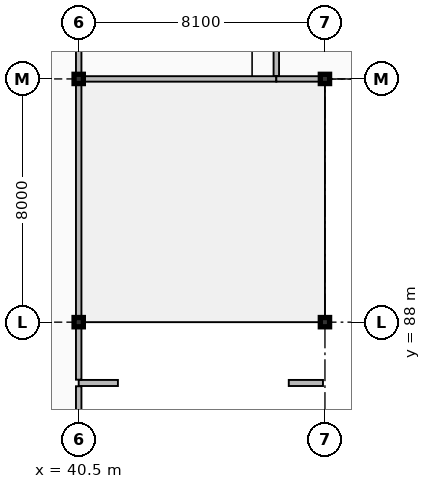
"""IFC4 building model, lengths in metres.
Left out: names, types, materials, properties, quantities, classifications, styles, units other than length and angle.
Written with IfcOpenShell. Run it as: python <this file> out.ifc"""

import sys

from ifc_helpers import new_model, si_unit, direction, frame, frame_2d, origin, origin_2d, place, context, subcontext, project, spatial, rectangle, hollow_rectangle, extrude, element, fill, save


model = new_model("IFC4")
c1 = context("Model", 3, precision=1e-05, world=origin(), true_north=direction((0.0, 1.0)))
c2 = subcontext(c1, "Body", "Model", "MODEL_VIEW")
j1 = project(units=[si_unit("LENGTHUNIT", "METRE"), si_unit("PLANEANGLEUNIT", "RADIAN")], contexts=[c1])
p1 = place(None, origin())
s1 = spatial("IfcSite", under=j1, at=p1, CompositionType="ELEMENT")
p2 = place(p1, origin())
s2 = spatial("IfcBuilding", under=s1, at=p2, CompositionType="ELEMENT")
p3 = place(p2, frame((0.0, 0.0, 14.7)))
s3 = spatial("IfcBuildingStorey", under=s2, at=p3, CompositionType="ELEMENT", Elevation=14.7)
for number, where, z_axis, x_axis in (
    (1, (40.5, 88.0, 0.0), (0.0, 0.0, 1.0), (1.0, 0.0, 0.0)),
    (2, (40.5, 96.0, 0.0), (0.0, 0.0, 1.0), (1.0, 0.0, 0.0)),
):
    element("IfcColumn", number, at=place(p3, frame(where, z_axis=z_axis, x_axis=x_axis)), inside=s3, PredefinedType="COLUMN", context=c2, shape_type="SweptSolid", body=[
        extrude(hollow_rectangle(XDim=0.305, YDim=0.305, WallThickness=0.016, InnerFilletRadius=0.016, OuterFilletRadius=0.032, at=origin_2d()), origin(), (0.0, 0.0, 1.0), 5.1),
    ])
p4 = place(p3, frame((48.6, 88.0, 0.0), z_axis=(0.0, 0.0, 1.0), x_axis=(1.0, 0.0, 0.0)))
e3 = element("IfcColumn", 3, at=p4, inside=s3, PredefinedType="COLUMN", context=c2, shape_type="SweptSolid", body=[
    extrude(hollow_rectangle(XDim=0.305, YDim=0.305, WallThickness=0.016, InnerFilletRadius=0.016, OuterFilletRadius=0.032, at=origin_2d()), origin(), (0.0, 0.0, 1.0), 4.84),
])
p5 = place(p3, frame((48.6, 96.0, 0.0), z_axis=(0.0, 0.0, 1.0), x_axis=(1.0, 0.0, 0.0)))
e4 = element("IfcColumn", 4, at=p5, inside=s3, PredefinedType="COLUMN", context=c2, shape_type="SweptSolid", body=[
    extrude(hollow_rectangle(XDim=0.305, YDim=0.305, WallThickness=0.016, InnerFilletRadius=0.016, OuterFilletRadius=0.032, at=origin_2d()), origin(), (0.0, 0.0, 1.0), 5.1),
])
p6 = place(p3, frame((40.5, 86.0, 0.0), z_axis=(0.0, 0.0, 1.0), x_axis=(1.0, 0.0, 0.0)))
e5 = element("IfcWall", 5, at=p6, inside=s3, PredefinedType="PARTITIONING", context=c2, shape_type="SweptSolid", body=[
    extrude(rectangle(XDim=1.29, YDim=0.2, at=frame_2d((0.645, 0.0))), origin(), (0.0, 0.0, 1.0), 4.84),
])
p7 = place(p3, frame((47.41, 86.0, 0.0), z_axis=(0.0, 0.0, 1.0), x_axis=(1.0, 0.0, 0.0)))
e6 = element("IfcWall", 6, at=p7, inside=s3, PredefinedType="PARTITIONING", context=c2, shape_type="SweptSolid", body=[
    extrude(rectangle(XDim=1.125, YDim=0.2, at=frame_2d((0.562, 0.0))), origin(), (0.0, 0.0, 1.0), 4.84),
])
p8 = place(p3, frame((40.66, 96.0, 0.0), z_axis=(0.0, 0.0, 1.0), x_axis=(1.0, 0.0, 0.0)))
e7 = element("IfcWall", 7, at=p8, inside=s3, PredefinedType="PARTITIONING", context=c2, shape_type="SweptSolid", body=[
    extrude(rectangle(XDim=6.34, YDim=0.18, at=frame_2d((3.17, 0.0))), origin(), (0.0, 0.0, 1.0), 4.299),
])
p9 = place(p3, frame((47.0, 96.0, 0.0), z_axis=(0.0, 0.0, 1.0), x_axis=(1.0, 0.0, 0.0)))
e8 = element("IfcWall", 8, at=p9, inside=s3, PredefinedType="PARTITIONING", context=c2, shape_type="SweptSolid", body=[
    extrude(rectangle(XDim=1.44, YDim=0.18, at=frame_2d((0.72, 0.0))), origin(), (0.0, 0.0, 1.0), 4.299),
])
p10 = place(p3, frame((40.5, 80.16, 0.0), z_axis=(0.0, 0.0, 1.0), x_axis=(0.0, 1.0, 0.0)))
e9 = element("IfcWall", 9, at=p10, inside=s3, PredefinedType="PARTITIONING", context=c2, shape_type="SweptSolid", body=[
    extrude(rectangle(XDim=5.732, YDim=0.18, at=frame_2d((2.866, 0.0))), origin(), (0.0, 0.0, 1.0), 4.369),
])
p11 = place(p3, frame((40.5, 86.108, 0.0), z_axis=(0.0, 0.0, 1.0), x_axis=(0.0, 1.0, 0.0)))
e10 = element("IfcWall", 10, at=p11, inside=s3, PredefinedType="PARTITIONING", context=c2, shape_type="SweptSolid", body=[
    extrude(rectangle(XDim=1.732, YDim=0.18, at=frame_2d((0.866, 0.0))), origin(), (0.0, 0.0, 1.0), 4.369),
])
p12 = place(p3, frame((40.5, 88.16, 0.0), z_axis=(0.0, 0.0, 1.0), x_axis=(0.0, 1.0, 0.0)))
e11 = element("IfcWall", 11, at=p12, inside=s3, PredefinedType="PARTITIONING", context=c2, shape_type="SweptSolid", body=[
    extrude(rectangle(XDim=7.679, YDim=0.18, at=frame_2d((3.84, 0.0))), origin(), (0.0, 0.0, 1.0), 4.369),
])
p13 = place(p12, frame((3.29, 0.0, 0.0)))
e12 = element("IfcOpeningElement", 12, at=p13, cuts=e11, PredefinedType="OPENING", context=c2, shape_type="SweptSolid", body=[
    extrude(rectangle(XDim=1.1, YDim=2.2, at=frame_2d((0.55, 1.1))), frame((0.0, 0.1, 0.0), z_axis=(0.0, -1.0, 0.0), x_axis=(1.0, 0.0, 0.0)), (0.0, 0.0, 1.0), 0.2),
])
p14 = place(p3, frame((40.5, 96.16, 0.0), z_axis=(0.0, 0.0, 1.0), x_axis=(0.0, 1.0, 0.0)))
e13 = element("IfcWall", 13, at=p14, inside=s3, PredefinedType="PARTITIONING", context=c2, shape_type="SweptSolid", body=[
    extrude(rectangle(XDim=7.679, YDim=0.18, at=frame_2d((3.84, 0.0))), origin(), (0.0, 0.0, 1.0), 4.332),
])
p15 = place(p14, frame((3.24, 0.0, 0.0)))
e14 = element("IfcOpeningElement", 14, at=p15, cuts=e13, PredefinedType="OPENING", context=c2, shape_type="SweptSolid", body=[
    extrude(rectangle(XDim=1.2, YDim=2.2, at=frame_2d((0.6, 1.1))), frame((0.0, 0.1, 0.0), z_axis=(0.0, -1.0, 0.0), x_axis=(1.0, 0.0, 0.0)), (0.0, 0.0, 1.0), 0.2),
])
p16 = place(p3, frame((47.0, 96.098, 0.0), z_axis=(0.0, 0.0, 1.0), x_axis=(0.0, 1.0, 0.0)))
e15 = element("IfcWall", 15, at=p16, inside=s3, PredefinedType="PARTITIONING", context=c2, shape_type="SweptSolid", body=[
    extrude(rectangle(XDim=4.044, YDim=0.18, at=frame_2d((2.022, 0.0))), origin(), (0.0, 0.0, 1.0), 4.84),
])
p17 = place(p16, frame((1.472, 0.0, 0.0)))
e16 = element("IfcOpeningElement", 16, at=p17, cuts=e15, PredefinedType="OPENING", context=c2, shape_type="SweptSolid", body=[
    extrude(rectangle(XDim=1.1, YDim=2.2, at=frame_2d((0.55, 1.1))), frame((0.0, 0.1, 0.0), z_axis=(0.0, -1.0, 0.0), x_axis=(1.0, 0.0, 0.0)), (0.0, 0.0, 1.0), 0.2),
])
p18 = place(p13, frame((1.1, 0.0, 0.0), z_axis=(0.0, 0.0, 1.0), x_axis=(-1.0, 0.0, 0.0)))
e17 = element("IfcDoor", 17, at=p18, inside=s3, OperationType="SINGLE_SWING_LEFT", PredefinedType="DOOR", context=c2, shape_type="SweptSolid", body=[
    extrude(rectangle(XDim=1.1, YDim=2.2, at=frame_2d((0.55, 1.1))), frame((0.0, 0.025, 0.0), z_axis=(0.0, -1.0, 0.0), x_axis=(1.0, 0.0, 0.0)), (0.0, 0.0, 1.0), 0.05),
])
fill(e12, e17)
save(model, sys.argv[1])
